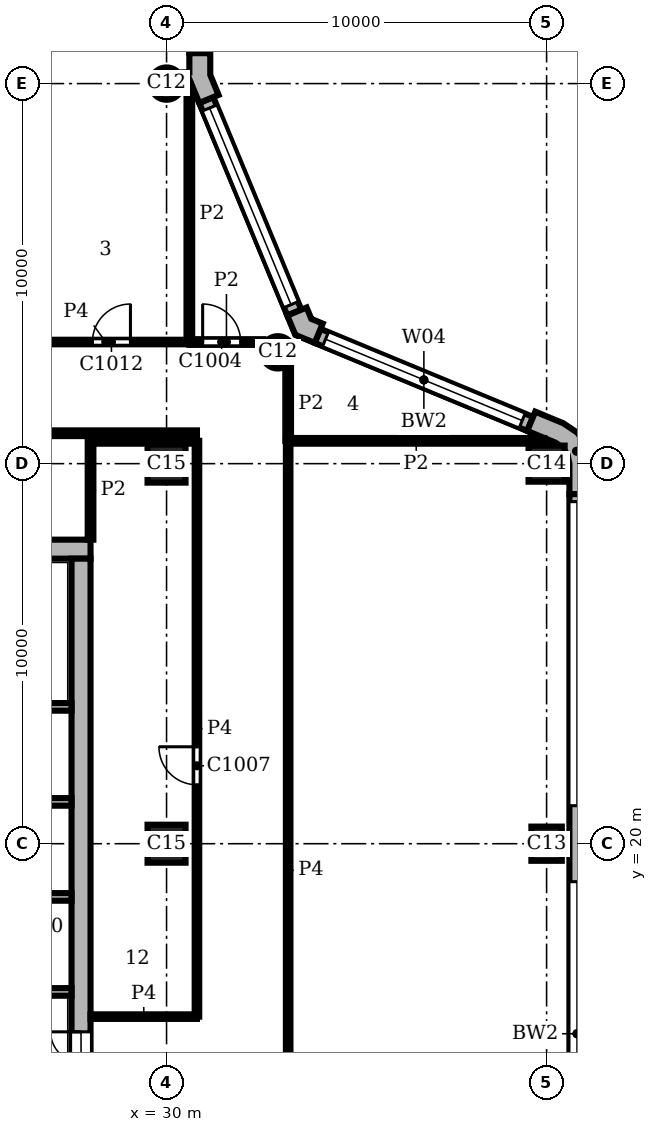
"""IFC4 building model, lengths in metres.
Left out: names, types, materials, properties, quantities, classifications, styles, units other than length and angle.
Written with IfcOpenShell. Run it as: python <this file> out.ifc"""

import sys

from ifc_helpers import new_model, si_unit, direction, frame, frame_2d, origin, origin_2d, place, context, subcontext, project, spatial, polyline, rectangle, circle, outline, extrude, element, fill, save


model = new_model("IFC4")
c1 = context("Model", 3, precision=1e-05, world=origin(), true_north=direction((0.0, 1.0)))
c2 = subcontext(c1, "Body", "Model", "MODEL_VIEW")
j1 = project(units=[si_unit("LENGTHUNIT", "METRE"), si_unit("PLANEANGLEUNIT", "RADIAN")], contexts=[c1])
p1 = place(None, origin())
s1 = spatial("IfcSite", under=j1, at=p1, CompositionType="ELEMENT")
p2 = place(p1, origin())
s2 = spatial("IfcBuilding", under=s1, at=p2, CompositionType="ELEMENT")
p3 = place(p2, frame((0.0, 0.0, 348.9)))
s3 = spatial("IfcBuildingStorey", under=s2, at=p3, CompositionType="ELEMENT", Elevation=348.9)
p4 = place(p3, frame((40.0, 20.0, 0.0), z_axis=(0.0, 0.0, 1.0), x_axis=(0.0, 1.0, 0.0)))
e1 = element("IfcColumn", 1, at=p4, inside=s3, PredefinedType="COLUMN", context=c2, shape_type="SweptSolid", body=[
    extrude(rectangle(XDim=0.9, YDim=0.8, at=origin_2d()), origin(), (0.0, 0.0, 1.0), 3.9),
])
p5 = place(p3, frame((40.0, 30.0, 0.0), z_axis=(0.0, 0.0, 1.0), x_axis=(1.0, 0.0, 0.0)))
e2 = element("IfcColumn", 2, at=p5, inside=s3, PredefinedType="COLUMN", context=c2, shape_type="SweptSolid", body=[
    extrude(rectangle(XDim=0.95, YDim=0.95, at=origin_2d()), origin(), (0.0, 0.0, 1.0), 3.9),
])
for number, where, z_axis, x_axis in (
    (3, (32.929, 32.929, 0.0), (0.0, 0.0, 1.0), (1.0, 0.0, 0.0)),
    (4, (30.0, 40.0, 0.0), (0.0, 0.0, 1.0), (1.0, 0.0, 0.0)),
):
    element("IfcColumn", number, at=place(p3, frame(where, z_axis=z_axis, x_axis=x_axis)), inside=s3, PredefinedType="COLUMN", context=c2, shape_type="SweptSolid", body=[
        extrude(circle(Radius=0.425, at=origin_2d()), origin(), (0.0, 0.0, 1.0), 3.9),
    ])
for number, where, z_axis, x_axis in (
    (5, (30.0, 20.0, 0.0), (0.0, 0.0, 1.0), (1.0, 0.0, 0.0)),
    (6, (30.0, 30.0, 0.0), (0.0, 0.0, 1.0), (1.0, 0.0, 0.0)),
):
    element("IfcColumn", number, at=place(p3, frame(where, z_axis=z_axis, x_axis=x_axis)), inside=s3, PredefinedType="COLUMN", context=c2, shape_type="SweptSolid", body=[
        extrude(rectangle(XDim=1.0, YDim=1.0, at=origin_2d()), origin(), (0.0, 0.0, 1.0), 3.9),
    ])
p6 = place(p3, frame((27.75, 8.5, 0.0), z_axis=(0.0, 0.0, 1.0), x_axis=(0.0, 1.0, 0.0)))
e7 = element("IfcWall", 7, at=p6, inside=s3, PredefinedType="SHEAR", context=c2, shape_type="SweptSolid", body=[
    extrude(rectangle(XDim=19.0, YDim=0.5, at=frame_2d((9.5, 0.0))), origin(), (0.0, 0.0, 1.0), 3.9),
])
p7 = place(p6, frame((4.95, 0.0, 0.0)))
e8 = element("IfcOpeningElement", 8, at=p7, cuts=e7, PredefinedType="OPENING", context=c2, shape_type="SweptSolid", body=[
    extrude(rectangle(XDim=1.6, YDim=2.1, at=frame_2d((0.8, 1.05))), frame((0.0, 0.26, 0.0), z_axis=(0.0, -1.0, 0.0), x_axis=(1.0, 0.0, 0.0)), (0.0, 0.0, 1.0), 0.52),
])
p8 = place(p3, frame((28.0, 27.75, 0.0), z_axis=(0.0, 0.0, 1.0), x_axis=(-1.0, 0.0, 0.0)))
e9 = element("IfcWall", 9, at=p8, inside=s3, PredefinedType="SHEAR", context=c2, shape_type="SweptSolid", body=[
    extrude(rectangle(XDim=20.0, YDim=0.5, at=frame_2d((10.0, 0.0))), origin(), (0.0, 0.0, 1.0), 3.9),
])
p9 = place(p3, origin())
e10 = element("IfcWall", 10, at=p9, inside=s3, PredefinedType="SOLIDWALL", context=c2, shape_type="SweptSolid", body=[
    extrude(outline(polyline([(41.0, 29.2), (41.15, 29.2), (41.15, 30.0), (41.062, 30.44), (40.813, 30.813), (40.44, 31.062), (39.701, 31.369), (39.644, 31.23), (39.49, 30.861), (40.229, 30.554), (40.424, 30.424), (40.554, 30.229), (40.6, 30.0), (40.6, 29.2), (41.0, 29.2)])), origin(), (0.0, 0.0, 1.0), 3.9),
])
e11 = element("IfcWall", 11, at=p9, inside=s3, PredefinedType="SOLIDWALL", context=c2, shape_type="SweptSolid", body=[
    extrude(outline(polyline([(34.051, 33.547), (34.108, 33.685), (33.809, 33.809), (33.685, 34.108), (33.547, 34.051), (33.177, 33.898), (33.388, 33.388), (33.898, 33.177), (34.051, 33.547)])), origin(), (0.0, 0.0, 1.0), 3.9),
])
e12 = element("IfcWall", 12, at=p9, inside=s3, PredefinedType="SOLIDWALL", context=c2, shape_type="SweptSolid", body=[
    extrude(outline(polyline([(30.62, 39.995), (30.62, 40.071), (30.861, 39.49), (31.23, 39.644), (31.369, 39.701), (31.15, 40.229), (31.15, 40.8), (31.0, 40.8), (30.6, 40.8), (30.6, 40.295), (30.425, 40.295), (30.425, 39.995), (30.62, 39.995)])), origin(), (0.0, 0.0, 1.0), 3.9),
])
p10 = place(p3, frame((40.8, 0.8, 0.0), z_axis=(0.0, 0.0, 1.0), x_axis=(0.0, 1.0, 0.0)))
e13 = element("IfcWall", 13, at=p10, inside=s3, PredefinedType="SOLIDWALL", context=c2, shape_type="SweptSolid", body=[
    extrude(rectangle(XDim=28.4, YDim=0.4, at=frame_2d((14.2, 0.0))), origin(), (0.0, 0.0, 1.0), 3.9),
])
p11 = place(p10, frame((0.2, 0.0, 0.9)))
e14 = element("IfcOpeningElement", 14, at=p11, cuts=e13, PredefinedType="OPENING", context=c2, shape_type="SweptSolid", body=[
    extrude(rectangle(XDim=8.0, YDim=2.35, at=frame_2d((4.0, 1.175))), frame((0.0, 0.21, 0.0), z_axis=(0.0, -1.0, 0.0), x_axis=(1.0, 0.0, 0.0)), (0.0, 0.0, 1.0), 0.42),
])
p12 = place(p10, frame((10.2, 0.0, 0.9)))
e15 = element("IfcOpeningElement", 15, at=p12, cuts=e13, PredefinedType="OPENING", context=c2, shape_type="SweptSolid", body=[
    extrude(rectangle(XDim=8.0, YDim=2.35, at=frame_2d((4.0, 1.175))), frame((0.0, 0.21, 0.0), z_axis=(0.0, -1.0, 0.0), x_axis=(1.0, 0.0, 0.0)), (0.0, 0.0, 1.0), 0.42),
])
p13 = place(p10, frame((20.2, 0.0, 0.9)))
e16 = element("IfcOpeningElement", 16, at=p13, cuts=e13, PredefinedType="OPENING", context=c2, shape_type="SweptSolid", body=[
    extrude(rectangle(XDim=8.0, YDim=2.35, at=frame_2d((4.0, 1.175))), frame((0.0, 0.21, 0.0), z_axis=(0.0, -1.0, 0.0), x_axis=(1.0, 0.0, 0.0)), (0.0, 0.0, 1.0), 0.42),
])
p14 = place(p3, frame((39.567, 31.045, 0.0), z_axis=(0.0, 0.0, 1.0), x_axis=(-0.923891000409, 0.382655745237, 0.0)))
e17 = element("IfcWall", 17, at=p14, inside=s3, PredefinedType="SOLIDWALL", context=c2, shape_type="SweptSolid", body=[
    extrude(rectangle(XDim=6.053, YDim=0.4, at=frame_2d((3.027, 0.0))), origin(), (0.0, 0.0, 1.0), 3.9),
])
p15 = place(p14, frame((0.227, 0.0, 0.9)))
e18 = element("IfcOpeningElement", 18, at=p15, cuts=e17, PredefinedType="OPENING", context=c2, shape_type="SweptSolid", body=[
    extrude(rectangle(XDim=5.6, YDim=2.35, at=frame_2d((2.8, 1.175))), frame((0.0, 0.21, 0.0), z_axis=(0.0, -1.0, 0.0), x_axis=(1.0, 0.0, 0.0)), (0.0, 0.0, 1.0), 0.42),
])
p16 = place(p3, frame((33.362, 33.974, 0.0), z_axis=(0.0, 0.0, 1.0), x_axis=(-0.382655745237, 0.923891000409, 0.0)))
e19 = element("IfcWall", 19, at=p16, inside=s3, PredefinedType="SOLIDWALL", context=c2, shape_type="SweptSolid", body=[
    extrude(rectangle(XDim=6.053, YDim=0.4, at=frame_2d((3.027, 0.0))), origin(), (0.0, 0.0, 1.0), 3.9),
])
p17 = place(p16, frame((0.227, 0.0, 0.9)))
e20 = element("IfcOpeningElement", 20, at=p17, cuts=e19, PredefinedType="OPENING", context=c2, shape_type="SweptSolid", body=[
    extrude(rectangle(XDim=5.6, YDim=2.35, at=frame_2d((2.8, 1.175))), frame((0.0, 0.21, 0.0), z_axis=(0.0, -1.0, 0.0), x_axis=(1.0, 0.0, 0.0)), (0.0, 0.0, 1.0), 0.42),
])
p18 = place(p3, frame((30.8, 40.8, 0.0), z_axis=(0.0, 0.0, 1.0), x_axis=(0.0, 1.0, 0.0)))
e21 = element("IfcWall", 21, at=p18, inside=s3, PredefinedType="SOLIDWALL", context=c2, shape_type="SweptSolid", body=[
    extrude(rectangle(XDim=18.4, YDim=0.4, at=frame_2d((9.2, 0.0))), origin(), (0.0, 0.0, 1.0), 3.9),
])
p19 = place(p18, frame((0.2, 0.0, 0.9)))
e22 = element("IfcOpeningElement", 22, at=p19, cuts=e21, PredefinedType="OPENING", context=c2, shape_type="SweptSolid", body=[
    extrude(rectangle(XDim=8.0, YDim=2.35, at=frame_2d((4.0, 1.175))), frame((0.0, 0.21, 0.0), z_axis=(0.0, -1.0, 0.0), x_axis=(1.0, 0.0, 0.0)), (0.0, 0.0, 1.0), 0.42),
])
p20 = place(p18, frame((10.2, 0.0, 0.9)))
e23 = element("IfcOpeningElement", 23, at=p20, cuts=e21, PredefinedType="OPENING", context=c2, shape_type="SweptSolid", body=[
    extrude(rectangle(XDim=8.0, YDim=2.35, at=frame_2d((4.0, 1.175))), frame((0.0, 0.21, 0.0), z_axis=(0.0, -1.0, 0.0), x_axis=(1.0, 0.0, 0.0)), (0.0, 0.0, 1.0), 0.42),
])
for number, where, z_axis, x_axis in (
    (24, (24.3, 16.1, 0.0), (0.0, 0.0, 1.0), (1.0, 0.0, 0.0)),
    (25, (24.3, 18.6, 0.0), (0.0, 0.0, 1.0), (1.0, 0.0, 0.0)),
    (26, (24.3, 21.1, 0.0), (0.0, 0.0, 1.0), (1.0, 0.0, 0.0)),
):
    element("IfcWall", number, at=place(p3, frame(where, z_axis=z_axis, x_axis=x_axis)), inside=s3, PredefinedType="SHEAR", context=c2, shape_type="SweptSolid", body=[
        extrude(rectangle(XDim=3.2, YDim=0.2, at=frame_2d((1.6, 0.0))), origin(), (0.0, 0.0, 1.0), 3.45),
    ])
p21 = place(p3, frame((13.8, 23.6, 0.0), z_axis=(0.0, 0.0, 1.0), x_axis=(1.0, 0.0, 0.0)))
e27 = element("IfcWall", 27, at=p21, inside=s3, PredefinedType="SHEAR", context=c2, shape_type="SweptSolid", body=[
    extrude(rectangle(XDim=13.7, YDim=0.2, at=frame_2d((6.85, 0.0))), origin(), (0.0, 0.0, 1.0), 3.45),
])
p22 = place(p21, frame((2.4, 0.0, 0.0)))
e28 = element("IfcOpeningElement", 28, at=p22, cuts=e27, PredefinedType="OPENING", context=c2, shape_type="SweptSolid", body=[
    extrude(rectangle(XDim=1.1, YDim=2.1, at=frame_2d((0.55, 1.05))), frame((0.0, 0.11, 0.0), z_axis=(0.0, -1.0, 0.0), x_axis=(1.0, 0.0, 0.0)), (0.0, 0.0, 1.0), 0.22),
])
p23 = place(p21, frame((4.9, 0.0, 0.0)))
e29 = element("IfcOpeningElement", 29, at=p23, cuts=e27, PredefinedType="OPENING", context=c2, shape_type="SweptSolid", body=[
    extrude(rectangle(XDim=1.1, YDim=2.1, at=frame_2d((0.55, 1.05))), frame((0.0, 0.11, 0.0), z_axis=(0.0, -1.0, 0.0), x_axis=(1.0, 0.0, 0.0)), (0.0, 0.0, 1.0), 0.22),
])
p24 = place(p21, frame((0.15, 0.0, 0.0)))
e30 = element("IfcOpeningElement", 30, at=p24, cuts=e27, PredefinedType="OPENING", context=c2, shape_type="SweptSolid", body=[
    extrude(rectangle(XDim=1.0, YDim=2.1, at=frame_2d((0.5, 1.05))), frame((0.0, 0.11, 0.0), z_axis=(0.0, -1.0, 0.0), x_axis=(1.0, 0.0, 0.0)), (0.0, 0.0, 1.0), 0.22),
])
p25 = place(p3, frame((28.0, 28.0, 0.0), z_axis=(0.0, 0.0, 1.0), x_axis=(0.0, 1.0, 0.0)))
e31 = element("IfcWall", 31, at=p25, inside=s3, PredefinedType="PARTITIONING", context=c2, shape_type="SweptSolid", body=[
    extrude(rectangle(XDim=2.598, YDim=0.15, at=frame_2d((1.299, 0.0))), origin(), (0.0, 0.0, 1.0), 3.45),
])
p26 = place(p3, frame((30.6, 33.2, 0.0), z_axis=(0.0, 0.0, 1.0), x_axis=(0.0, 1.0, 0.0)))
e32 = element("IfcWall", 32, at=p26, inside=s3, PredefinedType="PARTITIONING", context=c2, shape_type="SweptSolid", body=[
    extrude(rectangle(XDim=6.738, YDim=0.15, at=frame_2d((3.369, 0.0))), origin(), (0.0, 0.0, 1.0), 3.45),
])
p27 = place(p3, frame((33.2, 30.6, 0.0), z_axis=(0.0, 0.0, 1.0), x_axis=(0.0, 1.0, 0.0)))
e33 = element("IfcWall", 33, at=p27, inside=s3, PredefinedType="PARTITIONING", context=c2, shape_type="SweptSolid", body=[
    extrude(rectangle(XDim=1.952, YDim=0.15, at=frame_2d((0.976, 0.0))), origin(), (0.0, 0.0, 1.0), 3.45),
])
p28 = place(p3, frame((28.002, 30.6, 0.0), z_axis=(0.0, 0.0, 1.0), x_axis=(1.0, 0.0, 0.0)))
e34 = element("IfcWall", 34, at=p28, inside=s3, PredefinedType="PARTITIONING", context=c2, shape_type="SweptSolid", body=[
    extrude(rectangle(XDim=2.798, YDim=0.15, at=frame_2d((1.399, 0.0))), origin(), (0.0, 0.0, 1.0), 3.45),
])
p29 = place(p3, frame((33.2, 30.6, 0.0), z_axis=(0.0, 0.0, 1.0), x_axis=(1.0, 0.0, 0.0)))
e35 = element("IfcWall", 35, at=p29, inside=s3, PredefinedType="PARTITIONING", context=c2, shape_type="SweptSolid", body=[
    extrude(rectangle(XDim=6.738, YDim=0.15, at=frame_2d((3.369, 0.0))), origin(), (0.0, 0.0, 1.0), 3.45),
])
p30 = place(p3, frame((13.802, 30.8, 0.0), z_axis=(0.0, 0.0, 1.0), x_axis=(1.0, 0.0, 0.0)))
e36 = element("IfcWall", 36, at=p30, inside=s3, PredefinedType="PARTITIONING", context=c2, shape_type="SweptSolid", body=[
    extrude(rectangle(XDim=16.998, YDim=0.15, at=frame_2d((8.499, 0.0))), origin(), (0.0, 0.0, 1.0), 3.45),
])
p31 = place(p30, frame((9.35, 0.0, 0.0)))
e37 = element("IfcOpeningElement", 37, at=p31, cuts=e36, PredefinedType="OPENING", context=c2, shape_type="SweptSolid", body=[
    extrude(rectangle(XDim=1.0, YDim=2.1, at=frame_2d((0.5, 1.05))), frame((0.0, 0.085, 0.0), z_axis=(0.0, -1.0, 0.0), x_axis=(1.0, 0.0, 0.0)), (0.0, 0.0, 1.0), 0.17),
])
p32 = place(p3, frame((30.6, 33.2, 0.0), z_axis=(0.0, 0.0, 1.0), x_axis=(1.0, 0.0, 0.0)))
e38 = element("IfcWall", 38, at=p32, inside=s3, PredefinedType="PARTITIONING", context=c2, shape_type="SweptSolid", body=[
    extrude(rectangle(XDim=1.952, YDim=0.15, at=frame_2d((0.976, 0.0))), origin(), (0.0, 0.0, 1.0), 3.45),
])
p33 = place(p32, frame((0.35, 0.0, 0.0)))
e39 = element("IfcOpeningElement", 39, at=p33, cuts=e38, PredefinedType="OPENING", context=c2, shape_type="SweptSolid", body=[
    extrude(rectangle(XDim=1.0, YDim=2.1, at=frame_2d((0.5, 1.05))), frame((0.0, 0.085, 0.0), z_axis=(0.0, -1.0, 0.0), x_axis=(1.0, 0.0, 0.0)), (0.0, 0.0, 1.0), 0.17),
])
p34 = place(p3, frame((30.8, 15.45, 0.0), z_axis=(0.0, 0.0, 1.0), x_axis=(0.0, 1.0, 0.0)))
e40 = element("IfcWall", 40, at=p34, inside=s3, PredefinedType="PARTITIONING", context=c2, shape_type="SweptSolid", body=[
    extrude(rectangle(XDim=15.15, YDim=0.12, at=frame_2d((7.575, 0.0))), origin(), (0.0, 0.0, 1.0), 3.45),
])
p35 = place(p34, frame((6.1, 0.0, 0.0)))
e41 = element("IfcOpeningElement", 41, at=p35, cuts=e40, PredefinedType="OPENING", context=c2, shape_type="SweptSolid", body=[
    extrude(rectangle(XDim=1.0, YDim=2.1, at=frame_2d((0.5, 1.05))), frame((0.0, 0.07, 0.0), z_axis=(0.0, -1.0, 0.0), x_axis=(1.0, 0.0, 0.0)), (0.0, 0.0, 1.0), 0.14),
])
p36 = place(p3, frame((33.2, 8.0, 0.0), z_axis=(0.0, 0.0, 1.0), x_axis=(0.0, 1.0, 0.0)))
e42 = element("IfcWall", 42, at=p36, inside=s3, PredefinedType="PARTITIONING", context=c2, shape_type="SweptSolid", body=[
    extrude(rectangle(XDim=22.6, YDim=0.12, at=frame_2d((11.3, 0.0))), origin(), (0.0, 0.0, 1.0), 3.45),
])
p37 = place(p3, frame((28.0, 15.45, 0.0), z_axis=(0.0, 0.0, 1.0), x_axis=(1.0, 0.0, 0.0)))
e43 = element("IfcWall", 43, at=p37, inside=s3, PredefinedType="PARTITIONING", context=c2, shape_type="SweptSolid", body=[
    extrude(rectangle(XDim=2.8, YDim=0.12, at=frame_2d((1.4, 0.0))), origin(), (0.0, 0.0, 1.0), 3.45),
])
p38 = place(p3, frame((26.2, 33.2, 0.0), z_axis=(0.0, 0.0, 1.0), x_axis=(1.0, 0.0, 0.0)))
e44 = element("IfcWall", 44, at=p38, inside=s3, PredefinedType="PARTITIONING", context=c2, shape_type="SweptSolid", body=[
    extrude(rectangle(XDim=4.4, YDim=0.12, at=frame_2d((2.2, 0.0))), origin(), (0.0, 0.0, 1.0), 3.45),
])
p39 = place(p38, frame((1.85, 0.0, 0.0)))
e45 = element("IfcOpeningElement", 45, at=p39, cuts=e44, PredefinedType="OPENING", context=c2, shape_type="SweptSolid", body=[
    extrude(rectangle(XDim=1.0, YDim=2.1, at=frame_2d((0.5, 1.05))), frame((0.0, 0.07, 0.0), z_axis=(0.0, -1.0, 0.0), x_axis=(1.0, 0.0, 0.0)), (0.0, 0.0, 1.0), 0.14),
])
p40 = place(p12, origin())
e46 = element("IfcWindow", 46, at=p40, inside=s3, PartitioningType="SINGLE_PANEL", PredefinedType="WINDOW", context=c2, shape_type="SweptSolid", body=[
    extrude(rectangle(XDim=8.0, YDim=2.35, at=frame_2d((4.0, 1.175))), frame((0.0, 0.16, 0.0), z_axis=(0.0, -1.0, 0.0), x_axis=(1.0, 0.0, 0.0)), (0.0, 0.0, 1.0), 0.06),
])
fill(e15, e46)
p41 = place(p13, origin())
e47 = element("IfcWindow", 47, at=p41, inside=s3, PartitioningType="SINGLE_PANEL", PredefinedType="WINDOW", context=c2, shape_type="SweptSolid", body=[
    extrude(rectangle(XDim=8.0, YDim=2.35, at=frame_2d((4.0, 1.175))), frame((0.0, 0.16, 0.0), z_axis=(0.0, -1.0, 0.0), x_axis=(1.0, 0.0, 0.0)), (0.0, 0.0, 1.0), 0.06),
])
fill(e16, e47)
p42 = place(p15, origin())
e48 = element("IfcWindow", 48, at=p42, inside=s3, PartitioningType="SINGLE_PANEL", PredefinedType="WINDOW", context=c2, shape_type="SweptSolid", body=[
    extrude(rectangle(XDim=5.6, YDim=2.35, at=frame_2d((2.8, 1.175))), frame((0.0, 0.16, 0.0), z_axis=(0.0, -1.0, 0.0), x_axis=(1.0, 0.0, 0.0)), (0.0, 0.0, 1.0), 0.06),
])
fill(e18, e48)
p43 = place(p17, origin())
e49 = element("IfcWindow", 49, at=p43, inside=s3, PartitioningType="SINGLE_PANEL", PredefinedType="WINDOW", context=c2, shape_type="SweptSolid", body=[
    extrude(rectangle(XDim=5.6, YDim=2.35, at=frame_2d((2.8, 1.175))), frame((0.0, 0.16, 0.0), z_axis=(0.0, -1.0, 0.0), x_axis=(1.0, 0.0, 0.0)), (0.0, 0.0, 1.0), 0.06),
])
fill(e20, e49)
p44 = place(p7, origin())
e50 = element("IfcDoor", 50, at=p44, inside=s3, OperationType="DOUBLE_DOOR_SINGLE_SWING", PredefinedType="DOOR", context=c2, shape_type="SweptSolid", body=[
    extrude(rectangle(XDim=1.6, YDim=2.1, at=frame_2d((0.8, 1.05))), frame((0.0, 0.025, 0.0), z_axis=(0.0, -1.0, 0.0), x_axis=(1.0, 0.0, 0.0)), (0.0, 0.0, 1.0), 0.05),
])
fill(e8, e50)
p45 = place(p33, origin())
e51 = element("IfcDoor", 51, at=p45, inside=s3, OperationType="SINGLE_SWING_LEFT", PredefinedType="DOOR", context=c2, shape_type="SweptSolid", body=[
    extrude(rectangle(XDim=1.0, YDim=2.1, at=frame_2d((0.5, 1.05))), frame((0.0, 0.025, 0.0), z_axis=(0.0, -1.0, 0.0), x_axis=(1.0, 0.0, 0.0)), (0.0, 0.0, 1.0), 0.05),
])
fill(e39, e51)
p46 = place(p35, origin())
e52 = element("IfcDoor", 52, at=p46, inside=s3, OperationType="SINGLE_SWING_RIGHT", PredefinedType="DOOR", context=c2, shape_type="SweptSolid", body=[
    extrude(rectangle(XDim=1.0, YDim=2.1, at=frame_2d((0.5, 1.05))), frame((0.0, 0.025, 0.0), z_axis=(0.0, -1.0, 0.0), x_axis=(1.0, 0.0, 0.0)), (0.0, 0.0, 1.0), 0.05),
])
fill(e41, e52)
p47 = place(p39, origin())
e53 = element("IfcDoor", 53, at=p47, inside=s3, OperationType="SINGLE_SWING_RIGHT", PredefinedType="DOOR", context=c2, shape_type="SweptSolid", body=[
    extrude(rectangle(XDim=1.0, YDim=2.1, at=frame_2d((0.5, 1.05))), frame((0.0, 0.025, 0.0), z_axis=(0.0, -1.0, 0.0), x_axis=(1.0, 0.0, 0.0)), (0.0, 0.0, 1.0), 0.05),
])
fill(e45, e53)
save(model, sys.argv[1])
